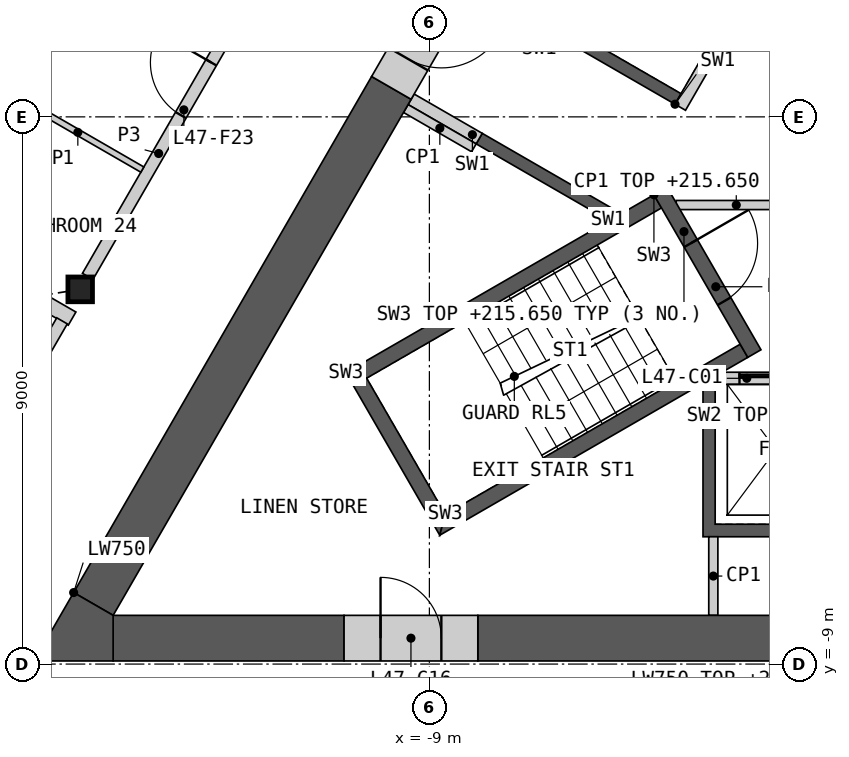
"""IFC4 building model, lengths in metres.
Left out: names, types, materials, properties, quantities, classifications, styles, units other than length and angle.
Written with IfcOpenShell. Run it as: python <this file> out.ifc"""

import sys

from ifc_helpers import new_model, si_unit, direction, frame, frame_2d, origin, origin_2d, place, context, subcontext, project, spatial, polyline, rectangle, i_section, outline, extrude, element, fill, save


model = new_model("IFC4")
c1 = context("Model", 3, precision=1e-05, world=origin(), true_north=direction((0.0, 1.0)))
c2 = subcontext(c1, "Body", "Model", "MODEL_VIEW")
j1 = project(units=[si_unit("LENGTHUNIT", "METRE"), si_unit("PLANEANGLEUNIT", "RADIAN")], contexts=[c1])
p1 = place(None, origin())
s1 = spatial("IfcSite", under=j1, at=p1, CompositionType="ELEMENT")
p2 = place(p1, origin())
s2 = spatial("IfcBuilding", under=s1, at=p2, CompositionType="ELEMENT")
p3 = place(p2, frame((0.0, 0.0, 212.4)))
s3 = spatial("IfcBuildingStorey", under=s2, at=p3, CompositionType="ELEMENT", Elevation=212.4)
p4 = place(p3, frame((-14.743, -2.837, 0.0), z_axis=(0.0, 0.0, 1.0), x_axis=(1.0, 0.0, 0.0)))
e1 = element("IfcColumn", 1, at=p4, inside=s3, PredefinedType="COLUMN", context=c2, shape_type="SweptSolid", body=[
    extrude(i_section(OverallWidth=0.404, OverallDepth=0.407, WebThickness=0.027, FlangeThickness=0.044, at=origin_2d()), origin(), (0.0, 0.0, 1.0), 3.6),
])
p5 = place(p3, origin())
e2 = element("IfcWall", 2, at=p5, inside=s3, PredefinedType="SHEAR", context=c2, shape_type="SweptSolid", body=[
    extrude(outline(polyline([(0.1, -4.4), (0.1, -6.906), (-4.5, -6.906), (-4.5, -4.4), (-4.3, -4.4), (-4.3, -6.7), (-2.3, -6.7), (-2.3, -4.4), (-2.1, -4.4), (-2.1, -6.7), (-0.1, -6.7), (-0.1, -4.4), (0.1, -4.4)])), origin(), (0.0, 0.0, 1.0), 3.25),
])
p6 = place(p3, frame((-4.187, -4.3, 0.0), z_axis=(0.0, 0.0, 1.0), x_axis=(1.0, 0.0, 0.0)))
e3 = element("IfcWall", 3, at=p6, inside=s3, PredefinedType="SOLIDWALL", context=c2, shape_type="SweptSolid", body=[
    extrude(rectangle(XDim=8.373, YDim=0.2, at=frame_2d((4.187, 0.0))), origin(), (0.0, 0.0, 1.0), 3.25),
])
p7 = place(p6, frame((0.287, 0.0, 0.0)))
e4 = element("IfcOpeningElement", 4, at=p7, cuts=e3, PredefinedType="OPENING", context=c2, shape_type="SweptSolid", body=[
    extrude(rectangle(XDim=1.2, YDim=2.1, at=frame_2d((0.6, 1.05))), frame((0.0, 0.11, 0.0), z_axis=(0.0, -1.0, 0.0), x_axis=(1.0, 0.0, 0.0)), (0.0, 0.0, 1.0), 0.22),
])
p8 = place(p6, frame((2.387, 0.0, 0.0)))
e5 = element("IfcOpeningElement", 5, at=p8, cuts=e3, PredefinedType="OPENING", context=c2, shape_type="SweptSolid", body=[
    extrude(rectangle(XDim=1.4, YDim=2.1, at=frame_2d((0.7, 1.05))), frame((0.0, 0.11, 0.0), z_axis=(0.0, -1.0, 0.0), x_axis=(1.0, 0.0, 0.0)), (0.0, 0.0, 1.0), 0.22),
])
p9 = place(p6, frame((4.837, 0.0, 0.0)))
e6 = element("IfcOpeningElement", 6, at=p9, cuts=e3, PredefinedType="OPENING", context=c2, shape_type="SweptSolid", body=[
    extrude(rectangle(XDim=0.9, YDim=2.1, at=frame_2d((0.45, 1.05))), frame((0.0, 0.11, 0.0), z_axis=(0.0, -1.0, 0.0), x_axis=(1.0, 0.0, 0.0)), (0.0, 0.0, 1.0), 0.22),
])
p10 = place(p6, frame((6.887, 0.0, 0.0)))
e7 = element("IfcOpeningElement", 7, at=p10, cuts=e3, PredefinedType="OPENING", context=c2, shape_type="SweptSolid", body=[
    extrude(rectangle(XDim=1.2, YDim=2.1, at=frame_2d((0.6, 1.05))), frame((0.0, 0.11, 0.0), z_axis=(0.0, -1.0, 0.0), x_axis=(1.0, 0.0, 0.0)), (0.0, 0.0, 1.0), 0.22),
])
p11 = place(p3, origin())
e8 = element("IfcWall", 8, at=p11, inside=s3, PredefinedType="SHEAR", context=c2, shape_type="SweptSolid", body=[
    extrude(outline(polyline([(-6.061, -1.697), (-8.231, -0.444), (-8.131, -0.271), (-5.96, -1.524), (-6.061, -1.697)])), origin(), (0.0, 0.0, 1.0), 3.25),
])
p12 = place(p3, origin())
e9 = element("IfcWall", 9, at=p12, inside=s3, PredefinedType="SHEAR", context=c2, shape_type="SweptSolid", body=[
    extrude(outline(polyline([(-4.96, 0.208), (-7.131, 1.461), (-3.731, 7.35), (-1.561, 6.097), (-1.66, 5.924), (-3.652, 7.074), (-4.652, 5.342), (-2.66, 4.192), (-2.76, 4.019), (-4.752, 5.169), (-5.752, 3.437), (-3.76, 2.287), (-3.861, 2.113), (-5.852, 3.263), (-6.852, 1.531), (-4.861, 0.381), (-4.96, 0.208)])), origin(), (0.0, 0.0, 1.0), 3.25),
])
p13 = place(p3, frame((-1.631, 5.776, 0.0), z_axis=(0.0, 0.0, 1.0), x_axis=(-0.499992876559, -0.866029516466, 0.0)))
e10 = element("IfcWall", 10, at=p13, inside=s3, PredefinedType="SOLIDWALL", context=c2, shape_type="SweptSolid", body=[
    extrude(rectangle(XDim=6.486, YDim=0.2, at=frame_2d((3.243, 0.0))), origin(), (0.0, 0.0, 1.0), 3.25),
])
p14 = place(p13, frame((0.337, 0.0, 0.0)))
e11 = element("IfcOpeningElement", 11, at=p14, cuts=e10, PredefinedType="OPENING", context=c2, shape_type="SweptSolid", body=[
    extrude(rectangle(XDim=1.1, YDim=2.1, at=frame_2d((0.55, 1.05))), frame((0.0, 0.11, 0.0), z_axis=(0.0, -1.0, 0.0), x_axis=(1.0, 0.0, 0.0)), (0.0, 0.0, 1.0), 0.22),
])
p15 = place(p13, frame((2.537, 0.0, 0.0)))
e12 = element("IfcOpeningElement", 12, at=p15, cuts=e10, PredefinedType="OPENING", context=c2, shape_type="SweptSolid", body=[
    extrude(rectangle(XDim=1.1, YDim=2.1, at=frame_2d((0.55, 1.05))), frame((0.0, 0.11, 0.0), z_axis=(0.0, -1.0, 0.0), x_axis=(1.0, 0.0, 0.0)), (0.0, 0.0, 1.0), 0.22),
])
p16 = place(p3, frame((-8.181, -0.357, 0.0), z_axis=(0.0, 0.0, 1.0), x_axis=(-0.866003189247, 0.500038474733, 0.0)))
e13 = element("IfcWall", 13, at=p16, inside=s3, PredefinedType="SHEAR", context=c2, shape_type="SweptSolid", body=[
    extrude(rectangle(XDim=1.293, YDim=0.2, at=frame_2d((0.646, 0.0))), origin(), (0.0, 0.0, 1.0), 3.25),
])
p17 = place(p3, frame((-4.941, -1.45, 0.0), z_axis=(0.0, 0.0, 1.0), x_axis=(1.0, 0.0, 0.0)))
e14 = element("IfcWall", 14, at=p17, inside=s3, PredefinedType="PARTITIONING", context=c2, shape_type="SweptSolid", body=[
    extrude(rectangle(XDim=9.882, YDim=0.15, at=frame_2d((4.941, 0.0))), origin(), (0.0, 0.0, 1.0), 3.25),
])
p18 = place(p17, frame((4.391, 0.0, 0.0)))
e15 = element("IfcOpeningElement", 15, at=p18, cuts=e14, PredefinedType="OPENING", context=c2, shape_type="SweptSolid", body=[
    extrude(rectangle(XDim=1.1, YDim=2.1, at=frame_2d((0.55, 1.05))), frame((0.0, 0.085, 0.0), z_axis=(0.0, -1.0, 0.0), x_axis=(1.0, 0.0, 0.0)), (0.0, 0.0, 1.0), 0.17),
])
p19 = place(p3, origin())
e16 = element("IfcWall", 16, at=p19, inside=s3, PredefinedType="SHEAR", context=c2, shape_type="SweptSolid", body=[
    extrude(outline(polyline([(-5.307, -1.281), (-10.374, -4.206), (-10.032, -4.298), (-5.182, -1.498), (-5.307, -1.281)])), origin(), (0.0, 0.0, 1.0), 3.25),
])
p20 = place(p3, origin())
e17 = element("IfcWall", 17, at=p20, inside=s3, PredefinedType="SHEAR", context=c2, shape_type="SweptSolid", body=[
    extrude(outline(polyline([(-10.374, -4.206), (-8.83, -6.881), (-8.738, -6.539), (-10.032, -4.298), (-10.374, -4.206)])), origin(), (0.0, 0.0, 1.0), 3.25),
])
p21 = place(p3, origin())
e18 = element("IfcWall", 18, at=p21, inside=s3, PredefinedType="SHEAR", context=c2, shape_type="SweptSolid", body=[
    extrude(outline(polyline([(-8.738, -6.539), (-8.83, -6.881), (-3.763, -3.956), (-3.888, -3.739), (-8.738, -6.539)])), origin(), (0.0, 0.0, 1.0), 3.25),
])
p22 = place(p3, frame((-5.199, -1.219, 0.0), z_axis=(0.0, 0.0, 1.0), x_axis=(0.499982516597, -0.866035497597, 0.0)))
e19 = element("IfcWall", 19, at=p22, inside=s3, PredefinedType="SHEAR", context=c2, shape_type="SweptSolid", body=[
    extrude(rectangle(XDim=3.088, YDim=0.25, at=frame_2d((1.544, 0.0))), origin(), (0.0, 0.0, 1.0), 3.25),
])
p23 = place(p22, frame((0.994, 0.0, 0.0)))
e20 = element("IfcOpeningElement", 20, at=p23, cuts=e19, PredefinedType="OPENING", context=c2, shape_type="SweptSolid", body=[
    extrude(rectangle(XDim=1.1, YDim=2.1, at=frame_2d((0.55, 1.05))), frame((0.0, 0.135, 0.0), z_axis=(0.0, -1.0, 0.0), x_axis=(1.0, 0.0, 0.0)), (0.0, 0.0, 1.0), 0.27),
])
for number, where, z_axis, x_axis in (
    (21, (-8.268, -0.509, 0.0), (0.0, 0.0, 1.0), (-0.866, 0.5, 0.0)),
    (22, (-4.33, -8.199, 0.0), (0.0, 0.0, 1.0), (0.0, 1.0, 0.0)),
):
    element("IfcWall", number, at=place(p3, frame(where, z_axis=z_axis, x_axis=x_axis)), inside=s3, PredefinedType="PARTITIONING", context=c2, shape_type="SweptSolid", body=[
        extrude(rectangle(XDim=1.293, YDim=0.15, at=frame_2d((0.646, 0.0))), origin(), (0.0, 0.0, 1.0), 3.25),
    ])
p24 = place(p3, frame((-8.203, -8.574, 0.0), z_axis=(0.0, 0.0, 1.0), x_axis=(1.0, 0.0, 0.0)))
e23 = element("IfcWall", 23, at=p24, inside=s3, PredefinedType="SHEAR", context=c2, shape_type="SweptSolid", body=[
    extrude(rectangle(XDim=4.926, YDim=0.75, at=frame_2d((2.463, 0.0))), origin(), (0.0, 0.0, 1.0), 3.25),
])
p25 = place(p3, frame((-14.201, -8.574, 0.0), z_axis=(0.0, 0.0, 1.0), x_axis=(1.0, 0.0, 0.0)))
e24 = element("IfcWall", 24, at=p25, inside=s3, PredefinedType="SHEAR", context=c2, shape_type="SweptSolid", body=[
    extrude(rectangle(XDim=3.798, YDim=0.75, at=frame_2d((1.899, 0.0))), origin(), (0.0, 0.0, 1.0), 3.25),
])
p26 = place(p3, frame((-9.625, 0.477, 0.0), z_axis=(0.0, 0.0, 1.0), x_axis=(-0.499986234705, -0.866033351035, 0.0)))
e25 = element("IfcWall", 25, at=p26, inside=s3, PredefinedType="SHEAR", context=c2, shape_type="SweptSolid", body=[
    extrude(rectangle(XDim=9.801, YDim=0.75, at=frame_2d((4.9, 0.0))), origin(), (0.0, 0.0, 1.0), 3.25),
])
p27 = place(p3, origin())
e26 = element("IfcWall", 26, at=p27, inside=s3, PredefinedType="SHEAR", context=c2, shape_type="SweptSolid", body=[
    extrude(outline(polyline([(-14.851, -7.824), (-14.201, -8.199), (-14.201, -8.949), (-15.5, -8.949), (-14.851, -7.824)])), origin(), (0.0, 0.0, 1.0), 3.25),
])
p28 = place(p3, frame((-10.403, -8.574, 0.0), z_axis=(0.0, 0.0, 1.0), x_axis=(1.0, 0.0, 0.0)))
e27 = element("IfcWall", 27, at=p28, inside=s3, PredefinedType="SHEAR", context=c2, shape_type="SweptSolid", body=[
    extrude(rectangle(XDim=2.2, YDim=0.75, at=frame_2d((1.1, 0.0))), origin(), (0.0, 0.0, 1.0), 3.25),
])
p29 = place(p28, frame((0.6, 0.0, 0.0)))
e28 = element("IfcOpeningElement", 28, at=p29, cuts=e27, PredefinedType="OPENING", context=c2, shape_type="SweptSolid", body=[
    extrude(rectangle(XDim=1.0, YDim=2.1, at=frame_2d((0.5, 1.05))), frame((0.0, 0.385, 0.0), z_axis=(0.0, -1.0, 0.0), x_axis=(1.0, 0.0, 0.0)), (0.0, 0.0, 1.0), 0.77),
])
p30 = place(p3, frame((-8.525, 2.382, 0.0), z_axis=(0.0, 0.0, 1.0), x_axis=(-0.500077893725, -0.86598042715, 0.0)))
e29 = element("IfcWall", 29, at=p30, inside=s3, PredefinedType="SHEAR", context=c2, shape_type="SweptSolid", body=[
    extrude(rectangle(XDim=2.2, YDim=0.75, at=frame_2d((1.1, 0.0))), origin(), (0.0, 0.0, 1.0), 3.25),
])
p31 = place(p30, frame((0.55, 0.0, 0.0)))
e30 = element("IfcOpeningElement", 30, at=p31, cuts=e29, PredefinedType="OPENING", context=c2, shape_type="SweptSolid", body=[
    extrude(rectangle(XDim=1.1, YDim=2.1, at=frame_2d((0.55, 1.05))), frame((0.0, 0.385, 0.0), z_axis=(0.0, -1.0, 0.0), x_axis=(1.0, 0.0, 0.0)), (0.0, 0.0, 1.0), 0.77),
])
p32 = place(p3, frame((-26.164, 3.199, 0.0), z_axis=(0.0, 0.0, 1.0), x_axis=(0.866029635251, -0.499992670813, 0.0)))
e31 = element("IfcWall", 31, at=p32, inside=s3, PredefinedType="PARTITIONING", context=c2, shape_type="SweptSolid", body=[
    extrude(rectangle(XDim=13.035, YDim=0.25, at=frame_2d((6.518, 0.0))), origin(), (0.0, 0.0, 1.0), 2.404),
])
p33 = place(p3, frame((-14.619, -2.624, 0.0), z_axis=(0.0, 0.0, 1.0), x_axis=(0.50000393355, 0.866023132736, 0.0)))
e32 = element("IfcWall", 32, at=p33, inside=s3, PredefinedType="PARTITIONING", context=c2, shape_type="SweptSolid", body=[
    extrude(rectangle(XDim=9.335, YDim=0.2, at=frame_2d((4.667, 0.0))), origin(), (0.0, 0.0, 1.0), 3.25),
])
p34 = place(p33, frame((3.062, 0.0, 0.0)))
e33 = element("IfcOpeningElement", 33, at=p34, cuts=e32, PredefinedType="OPENING", context=c2, shape_type="SweptSolid", body=[
    extrude(rectangle(XDim=1.0, YDim=2.1, at=frame_2d((0.5, 1.05))), frame((0.0, 0.11, 0.0), z_axis=(0.0, -1.0, 0.0), x_axis=(1.0, 0.0, 0.0)), (0.0, 0.0, 1.0), 0.22),
])
p35 = place(p3, frame((-17.744, -8.035, 0.0), z_axis=(0.0, 0.0, 1.0), x_axis=(0.500020937221, 0.866013315337, 0.0)))
e34 = element("IfcWall", 34, at=p35, inside=s3, PredefinedType="PARTITIONING", context=c2, shape_type="SweptSolid", body=[
    extrude(rectangle(XDim=5.405, YDim=0.2, at=frame_2d((2.702, 0.0))), origin(), (0.0, 0.0, 1.0), 3.25),
])
p36 = place(p35, frame((0.35, 0.0, 0.0)))
e35 = element("IfcOpeningElement", 35, at=p36, cuts=e34, PredefinedType="OPENING", context=c2, shape_type="SweptSolid", body=[
    extrude(rectangle(XDim=1.1, YDim=2.1, at=frame_2d((0.55, 1.05))), frame((0.0, 0.11, 0.0), z_axis=(0.0, -1.0, 0.0), x_axis=(1.0, 0.0, 0.0)), (0.0, 0.0, 1.0), 0.22),
])
p37 = place(p3, frame((-15.843, 0.358, 0.0), z_axis=(0.0, 0.0, 1.0), x_axis=(0.866014668023, -0.500018594424, 0.0)))
e36 = element("IfcWall", 36, at=p37, inside=s3, PredefinedType="PARTITIONING", context=c2, shape_type="SweptSolid", body=[
    extrude(rectangle(XDim=2.45, YDim=0.1, at=frame_2d((1.225, 0.0))), origin(), (0.0, 0.0, 1.0), 2.404),
])
p38 = place(p7, origin())
e37 = element("IfcDoor", 37, at=p38, inside=s3, OperationType="SLIDING_TO_LEFT", PredefinedType="DOOR", context=c2, shape_type="SweptSolid", body=[
    extrude(rectangle(XDim=1.2, YDim=2.1, at=frame_2d((0.6, 1.05))), frame((0.0, 0.025, 0.0), z_axis=(0.0, -1.0, 0.0), x_axis=(1.0, 0.0, 0.0)), (0.0, 0.0, 1.0), 0.05),
])
fill(e4, e37)
p39 = place(p23, origin())
e38 = element("IfcDoor", 38, at=p39, inside=s3, OperationType="SINGLE_SWING_LEFT", PredefinedType="DOOR", context=c2, shape_type="SweptSolid", body=[
    extrude(rectangle(XDim=1.1, YDim=2.1, at=frame_2d((0.55, 1.05))), frame((0.0, 0.025, 0.0), z_axis=(0.0, -1.0, 0.0), x_axis=(1.0, 0.0, 0.0)), (0.0, 0.0, 1.0), 0.05),
])
fill(e20, e38)
p40 = place(p29, origin())
e39 = element("IfcDoor", 39, at=p40, inside=s3, OperationType="SINGLE_SWING_LEFT", PredefinedType="DOOR", context=c2, shape_type="SweptSolid", body=[
    extrude(rectangle(XDim=1.0, YDim=2.1, at=frame_2d((0.5, 1.05))), frame((0.0, 0.13, 0.0), z_axis=(0.0, -1.0, 0.0), x_axis=(1.0, 0.0, 0.0)), (0.0, 0.0, 1.0), 0.05),
])
fill(e28, e39)
p41 = place(p31, origin())
e40 = element("IfcDoor", 40, at=p41, inside=s3, OperationType="SINGLE_SWING_LEFT", PredefinedType="DOOR", context=c2, shape_type="SweptSolid", body=[
    extrude(rectangle(XDim=1.1, YDim=2.1, at=frame_2d((0.55, 1.05))), frame((0.0, 0.13, 0.0), z_axis=(0.0, -1.0, 0.0), x_axis=(1.0, 0.0, 0.0)), (0.0, 0.0, 1.0), 0.05),
])
fill(e30, e40)
p42 = place(p34, origin())
e41 = element("IfcDoor", 41, at=p42, inside=s3, OperationType="SINGLE_SWING_RIGHT", PredefinedType="DOOR", context=c2, shape_type="SweptSolid", body=[
    extrude(rectangle(XDim=1.0, YDim=2.1, at=frame_2d((0.5, 1.05))), frame((0.0, 0.025, 0.0), z_axis=(0.0, -1.0, 0.0), x_axis=(1.0, 0.0, 0.0)), (0.0, 0.0, 1.0), 0.05),
])
fill(e33, e41)
save(model, sys.argv[1])
